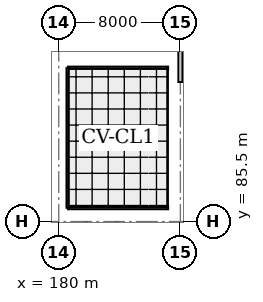
"""IFC4 building model, lengths in metres.
Left out: names, types, materials, properties, quantities, classifications, styles, units other than length and angle.
Written with IfcOpenShell. Run it as: python <this file> out.ifc"""

import sys

from ifc_helpers import new_model, si_unit, direction, frame, frame_2d, origin, origin_2d, place, context, subcontext, project, spatial, rectangle, i_section, extrude, element, fill, save


model = new_model("IFC4")
c1 = context("Model", 3, precision=1e-05, world=origin(), true_north=direction((0.0, 1.0)))
c2 = subcontext(c1, "Body", "Model", "MODEL_VIEW")
j1 = project(units=[si_unit("LENGTHUNIT", "METRE"), si_unit("PLANEANGLEUNIT", "RADIAN")], contexts=[c1])
p1 = place(None, origin())
s1 = spatial("IfcSite", under=j1, at=p1, CompositionType="ELEMENT")
p2 = place(p1, origin())
s2 = spatial("IfcBuilding", under=s1, at=p2, CompositionType="ELEMENT")
p3 = place(p2, frame((0.0, 0.0, 17.6)))
s3 = spatial("IfcBuildingStorey", under=s2, at=p3, CompositionType="ELEMENT", Elevation=17.6)
for number, where, z_axis, x_axis in (
    (1, (180.0, 85.5, 0.0), (0.0, 0.0, 1.0), (1.0, 0.0, 0.0)),
    (2, (180.0, 94.5, 0.0), (0.0, 0.0, 1.0), (1.0, 0.0, 0.0)),
    (3, (188.0, 85.5, 0.0), (0.0, 0.0, 1.0), (1.0, 0.0, 0.0)),
    (4, (188.0, 94.5, 0.0), (0.0, 0.0, 1.0), (1.0, 0.0, 0.0)),
):
    element("IfcColumn", number, at=place(p3, frame(where, z_axis=z_axis, x_axis=x_axis)), inside=s3, PredefinedType="COLUMN", context=c2, shape_type="SweptSolid", body=[
        extrude(i_section(OverallWidth=0.35, OverallDepth=0.35, WebThickness=0.012, FlangeThickness=0.019, FilletRadius=0.02, at=origin_2d()), origin(), (0.0, 0.0, 1.0), 3.2),
    ])
p4 = place(p3, frame((188.0, 103.325, 0.0), z_axis=(0.0, 0.0, 1.0), x_axis=(0.0, -1.0, 0.0)))
e5 = element("IfcWall", 5, at=p4, inside=s3, PredefinedType="SOLIDWALL", context=c2, shape_type="SweptSolid", body=[
    extrude(rectangle(XDim=8.65, YDim=0.27, at=frame_2d((4.325, 0.0))), origin(), (0.0, 0.0, 1.0), 2.375),
])
for number, where, z_axis, x_axis in (
    (6, (181.78, 85.42, 0.0), (0.0, 0.0, 1.0), (0.0, -1.0, 0.0)),
    (7, (183.82, 82.58, 0.0), (0.0, 0.0, 1.0), (0.0, 1.0, 0.0)),
):
    element("IfcWall", number, at=place(p3, frame(where, z_axis=z_axis, x_axis=x_axis)), inside=s3, PredefinedType="SOLIDWALL", context=c2, shape_type="SweptSolid", body=[
        extrude(rectangle(XDim=2.84, YDim=0.2, at=frame_2d((1.42, 0.0))), origin(), (0.0, 0.0, 1.0), 2.515),
    ])
p5 = place(p3, frame((187.2, 86.4, 0.0), z_axis=(0.0, 0.0, 1.0), x_axis=(-1.0, 0.0, 0.0)))
e8 = element("IfcWall", 8, at=p5, inside=s3, PredefinedType="PARTITIONING", context=c2, shape_type="SweptSolid", body=[
    extrude(rectangle(XDim=6.6, YDim=0.19, at=frame_2d((3.3, 0.0))), origin(), (0.0, 0.0, 1.0), 2.495),
])
p6 = place(p3, frame((180.6, 95.6, 0.0), z_axis=(0.0, 0.0, 1.0), x_axis=(1.0, 0.0, 0.0)))
e9 = element("IfcWall", 9, at=p6, inside=s3, PredefinedType="PARTITIONING", context=c2, shape_type="SweptSolid", body=[
    extrude(rectangle(XDim=6.6, YDim=0.19, at=frame_2d((3.3, 0.0))), origin(), (0.0, 0.0, 1.0), 2.495),
])
p7 = place(p6, frame((2.775, 0.0, 0.0)))
e10 = element("IfcOpeningElement", 10, at=p7, cuts=e9, PredefinedType="OPENING", context=c2, shape_type="SweptSolid", body=[
    extrude(rectangle(XDim=1.05, YDim=2.1, at=frame_2d((0.525, 1.05))), frame((0.0, 0.105, 0.0), z_axis=(0.0, -1.0, 0.0), x_axis=(1.0, 0.0, 0.0)), (0.0, 0.0, 1.0), 0.21),
])
p8 = place(p3, frame((180.6, 86.4, 0.0), z_axis=(0.0, 0.0, 1.0), x_axis=(0.0, 1.0, 0.0)))
e11 = element("IfcWall", 11, at=p8, inside=s3, PredefinedType="PARTITIONING", context=c2, shape_type="SweptSolid", body=[
    extrude(rectangle(XDim=9.2, YDim=0.19, at=frame_2d((4.6, 0.0))), origin(), (0.0, 0.0, 1.0), 2.515),
])
p9 = place(p7, origin())
e12 = element("IfcDoor", 12, at=p9, inside=s3, OperationType="SINGLE_SWING_RIGHT", PredefinedType="DOOR", context=c2, shape_type="SweptSolid", body=[
    extrude(rectangle(XDim=1.05, YDim=2.1, at=frame_2d((0.525, 1.05))), frame((0.0, 0.025, 0.0), z_axis=(0.0, -1.0, 0.0), x_axis=(1.0, 0.0, 0.0)), (0.0, 0.0, 1.0), 0.05),
])
fill(e10, e12)
save(model, sys.argv[1])
